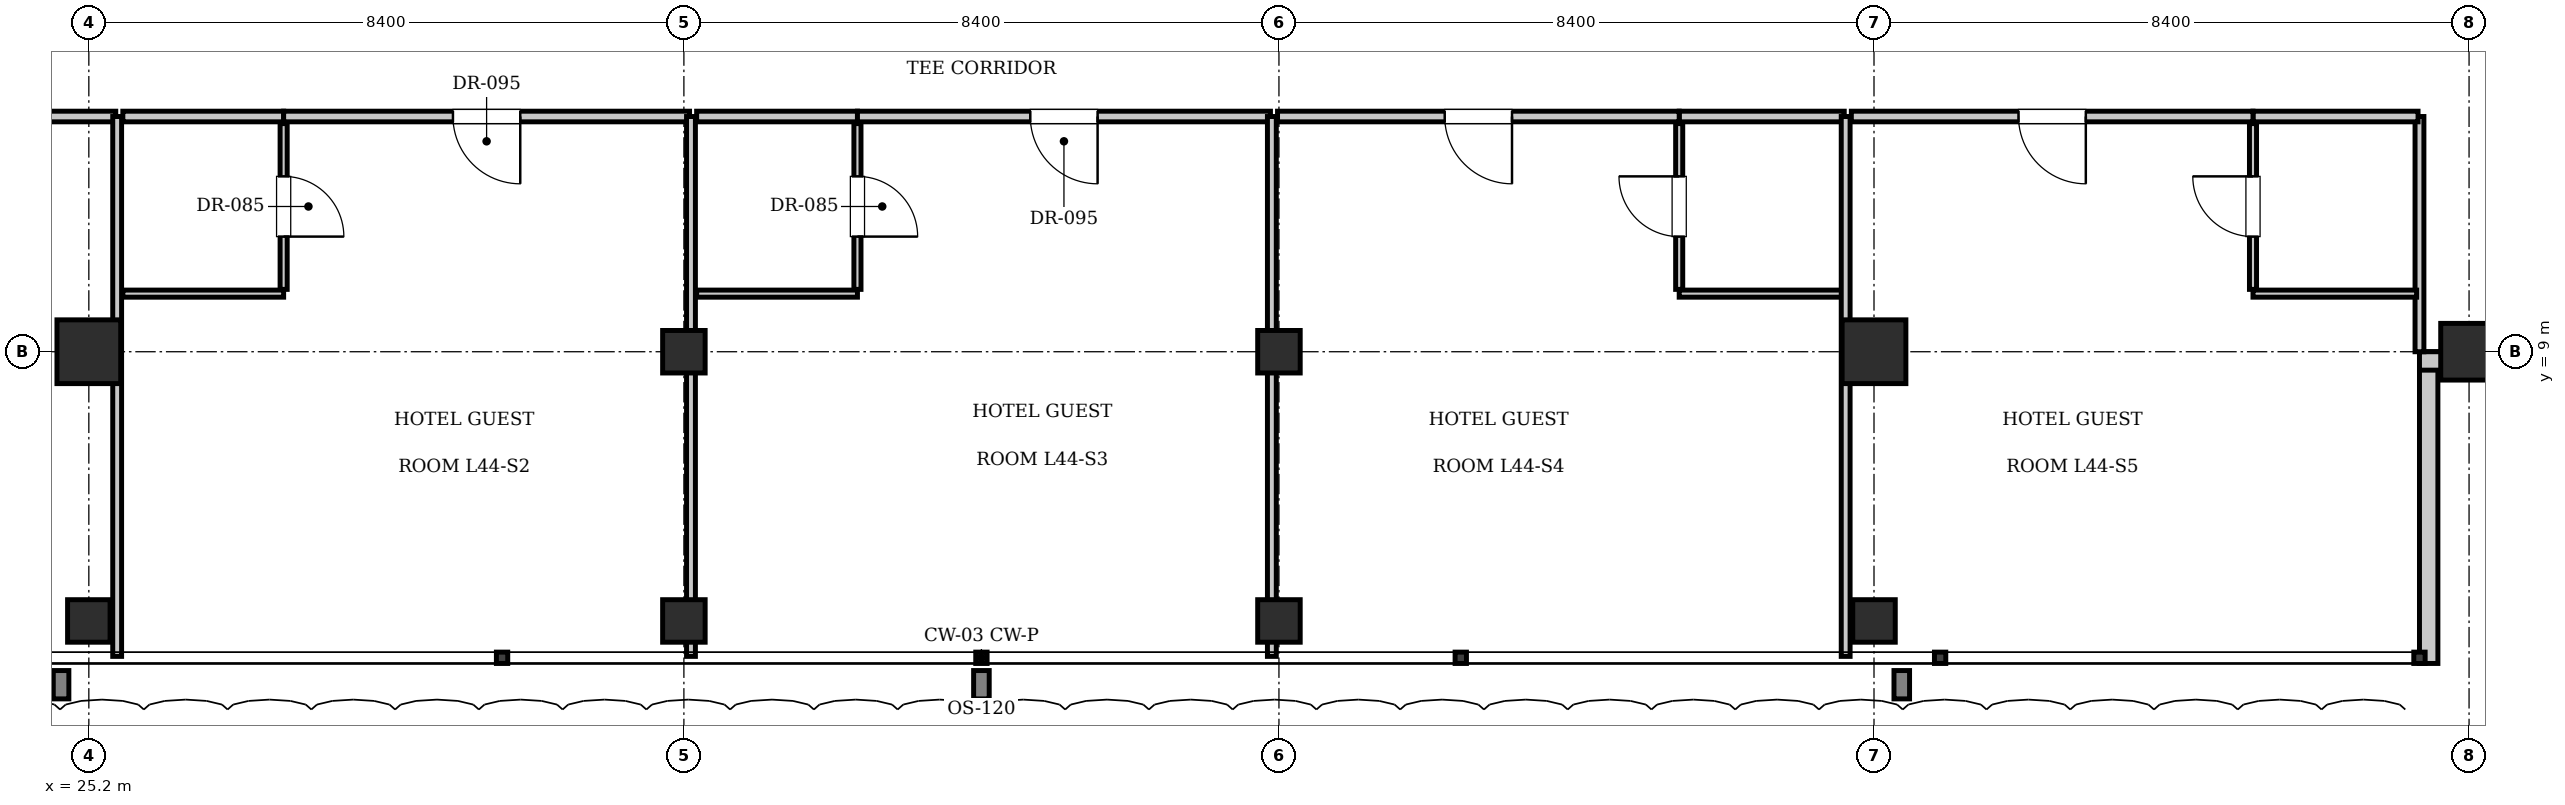
"""IFC4 building model, lengths in metres.
Left out: names, types, materials, properties, quantities, classifications, styles, units other than length and angle.
Written with IfcOpenShell. Run it as: python <this file> out.ifc"""

import sys

from ifc_helpers import new_model, si_unit, direction, frame, frame_2d, origin, origin_2d, place, context, subcontext, project, spatial, rectangle, i_section, extrude, element, fill, save


model = new_model("IFC4")
c1 = context("Model", 3, precision=1e-05, world=origin(), true_north=direction((0.0, 1.0)))
c2 = subcontext(c1, "Body", "Model", "MODEL_VIEW")
j1 = project(units=[si_unit("LENGTHUNIT", "METRE"), si_unit("PLANEANGLEUNIT", "RADIAN")], contexts=[c1])
p1 = place(None, origin())
s1 = spatial("IfcSite", under=j1, at=p1, CompositionType="ELEMENT")
p2 = place(p1, origin())
s2 = spatial("IfcBuilding", under=s1, at=p2, CompositionType="ELEMENT")
p3 = place(p2, frame((0.0, 0.0, 181.3)))
s3 = spatial("IfcBuildingStorey", under=s2, at=p3, CompositionType="ELEMENT", Elevation=181.3)
for number, where, z_axis, x_axis in (
    (1, (25.2, 9.0, 0.0), (0.0, 0.0, 1.0), (1.0, 0.0, 0.0)),
    (2, (50.4, 9.0, 0.0), (0.0, 0.0, 1.0), (1.0, 0.0, 0.0)),
):
    element("IfcColumn", number, at=place(p3, frame(where, z_axis=z_axis, x_axis=x_axis)), inside=s3, PredefinedType="COLUMN", context=c2, shape_type="SweptSolid", body=[
        extrude(rectangle(XDim=0.9, YDim=0.9, at=origin_2d()), origin(), (0.0, 0.0, 1.0), 3.85),
    ])
for number, where, z_axis, x_axis in (
    (3, (33.6, 9.0, 0.0), (0.0, 0.0, 1.0), (1.0, 0.0, 0.0)),
    (4, (42.0, 9.0, 0.0), (0.0, 0.0, 1.0), (1.0, 0.0, 0.0)),
):
    element("IfcColumn", number, at=place(p3, frame(where, z_axis=z_axis, x_axis=x_axis)), inside=s3, PredefinedType="COLUMN", context=c2, shape_type="SweptSolid", body=[
        extrude(i_section(OverallWidth=0.6, OverallDepth=0.6, WebThickness=0.025, FlangeThickness=0.038, at=origin_2d()), origin(), (0.0, 0.0, 1.0), 3.85),
    ])
p4 = place(p3, frame((58.8, 9.0, 0.0), z_axis=(0.0, 0.0, 1.0), x_axis=(1.0, 0.0, 0.0)))
e5 = element("IfcColumn", 5, at=p4, inside=s3, PredefinedType="COLUMN", context=c2, shape_type="SweptSolid", body=[
    extrude(rectangle(XDim=0.8, YDim=0.8, at=origin_2d()), origin(), (0.0, 0.0, 1.0), 3.85),
])
for number, where, z_axis, x_axis in (
    (6, (25.2, 5.2, 0.0), (0.0, 0.0, 1.0), (1.0, 0.0, 0.0)),
    (7, (33.6, 5.2, 0.0), (0.0, 0.0, 1.0), (1.0, 0.0, 0.0)),
    (8, (42.0, 5.2, 0.0), (0.0, 0.0, 1.0), (1.0, 0.0, 0.0)),
    (9, (50.4, 5.2, 0.0), (0.0, 0.0, 1.0), (1.0, 0.0, 0.0)),
):
    element("IfcColumn", number, at=place(p3, frame(where, z_axis=z_axis, x_axis=x_axis)), inside=s3, PredefinedType="COLUMN", context=c2, shape_type="SweptSolid", body=[
        extrude(i_section(OverallWidth=0.6, OverallDepth=0.6, WebThickness=0.025, FlangeThickness=0.038, at=origin_2d()), origin(), (0.0, 0.0, 1.0), 3.85),
    ])
p5 = place(p3, frame((58.23, 9.0, 0.0), z_axis=(0.0, 0.0, 1.0), x_axis=(0.0, -1.0, 0.0)))
e10 = element("IfcWall", 10, at=p5, inside=s3, PredefinedType="SOLIDWALL", context=c2, shape_type="SweptSolid", body=[
    extrude(rectangle(XDim=4.4, YDim=0.26, at=frame_2d((2.2, 0.0))), origin(), (0.0, 0.0, 1.0), 3.61),
])
p6 = place(p3, frame((62.5, 8.87, 0.0), z_axis=(0.0, 0.0, 1.0), x_axis=(-1.0, 0.0, 0.0)))
e11 = element("IfcWall", 11, at=p6, inside=s3, PredefinedType="SOLIDWALL", context=c2, shape_type="SweptSolid", body=[
    extrude(rectangle(XDim=4.4, YDim=0.26, at=frame_2d((2.2, 0.0))), origin(), (0.0, 0.0, 1.0), 3.007),
])
p7 = place(p3, frame((58.1, 9.0, 0.0), z_axis=(0.0, 0.0, 1.0), x_axis=(0.0, 1.0, 0.0)))
e12 = element("IfcWall", 12, at=p7, inside=s3, PredefinedType="PARTITIONING", context=c2, shape_type="SweptSolid", body=[
    extrude(rectangle(XDim=3.32, YDim=0.125, at=frame_2d((1.66, 0.0))), origin(), (0.0, 0.0, 1.0), 3.61),
])
p8 = place(p3, frame((19.85, 12.32, 0.0), z_axis=(0.0, 0.0, 1.0), x_axis=(1.0, 0.0, 0.0)))
e13 = element("IfcWall", 13, at=p8, inside=s3, PredefinedType="PARTITIONING", context=c2, shape_type="SweptSolid", body=[
    extrude(rectangle(XDim=5.73, YDim=0.15, at=frame_2d((2.865, 0.0))), origin(), (0.0, 0.0, 1.0), 3.61),
])
p9 = place(p8, frame((2.39, 0.0, 0.0)))
e14 = element("IfcOpeningElement", 14, at=p9, cuts=e13, PredefinedType="OPENING", context=c2, shape_type="SweptSolid", body=[
    extrude(rectangle(XDim=0.95, YDim=2.15, at=frame_2d((0.475, 1.075))), frame((0.0, 0.085, 0.0), z_axis=(0.0, -1.0, 0.0), x_axis=(1.0, 0.0, 0.0)), (0.0, 0.0, 1.0), 0.17),
])
p10 = place(p3, frame((25.6, 4.7, 0.0), z_axis=(0.0, 0.0, 1.0), x_axis=(0.0, 1.0, 0.0)))
e15 = element("IfcWall", 15, at=p10, inside=s3, PredefinedType="PARTITIONING", context=c2, shape_type="SweptSolid", body=[
    extrude(rectangle(XDim=7.62, YDim=0.125, at=frame_2d((3.81, 0.0))), origin(), (0.0, 0.0, 1.0), 3.61),
])
p11 = place(p3, frame((25.68, 12.32, 0.0), z_axis=(0.0, 0.0, 1.0), x_axis=(1.0, 0.0, 0.0)))
e16 = element("IfcWall", 16, at=p11, inside=s3, PredefinedType="PARTITIONING", context=c2, shape_type="SweptSolid", body=[
    extrude(rectangle(XDim=2.27, YDim=0.15, at=frame_2d((1.135, 0.0))), origin(), (0.0, 0.0, 1.0), 3.61),
])
p12 = place(p3, frame((25.68, 9.82, 0.0), z_axis=(0.0, 0.0, 1.0), x_axis=(1.0, 0.0, 0.0)))
e17 = element("IfcWall", 17, at=p12, inside=s3, PredefinedType="PARTITIONING", context=c2, shape_type="SweptSolid", body=[
    extrude(rectangle(XDim=2.27, YDim=0.1, at=frame_2d((1.135, 0.0))), origin(), (0.0, 0.0, 1.0), 3.61),
])
p13 = place(p3, frame((27.95, 9.88, 0.0), z_axis=(0.0, 0.0, 1.0), x_axis=(0.0, 1.0, 0.0)))
e18 = element("IfcWall", 18, at=p13, inside=s3, PredefinedType="PARTITIONING", context=c2, shape_type="SweptSolid", body=[
    extrude(rectangle(XDim=2.34, YDim=0.1, at=frame_2d((1.17, 0.0))), origin(), (0.0, 0.0, 1.0), 3.61),
])
p14 = place(p13, frame((0.745, 0.0, 0.0)))
e19 = element("IfcOpeningElement", 19, at=p14, cuts=e18, PredefinedType="OPENING", context=c2, shape_type="SweptSolid", body=[
    extrude(rectangle(XDim=0.85, YDim=2.1, at=frame_2d((0.425, 1.05))), frame((0.0, 0.06, 0.0), z_axis=(0.0, -1.0, 0.0), x_axis=(1.0, 0.0, 0.0)), (0.0, 0.0, 1.0), 0.12),
])
p15 = place(p3, frame((27.95, 12.32, 0.0), z_axis=(0.0, 0.0, 1.0), x_axis=(1.0, 0.0, 0.0)))
e20 = element("IfcWall", 20, at=p15, inside=s3, PredefinedType="PARTITIONING", context=c2, shape_type="SweptSolid", body=[
    extrude(rectangle(XDim=5.73, YDim=0.15, at=frame_2d((2.865, 0.0))), origin(), (0.0, 0.0, 1.0), 3.61),
])
p16 = place(p15, frame((2.39, 0.0, 0.0)))
e21 = element("IfcOpeningElement", 21, at=p16, cuts=e20, PredefinedType="OPENING", context=c2, shape_type="SweptSolid", body=[
    extrude(rectangle(XDim=0.95, YDim=2.15, at=frame_2d((0.475, 1.075))), frame((0.0, 0.085, 0.0), z_axis=(0.0, -1.0, 0.0), x_axis=(1.0, 0.0, 0.0)), (0.0, 0.0, 1.0), 0.17),
])
p17 = place(p3, frame((33.7, 4.7, 0.0), z_axis=(0.0, 0.0, 1.0), x_axis=(0.0, 1.0, 0.0)))
e22 = element("IfcWall", 22, at=p17, inside=s3, PredefinedType="PARTITIONING", context=c2, shape_type="SweptSolid", body=[
    extrude(rectangle(XDim=7.62, YDim=0.125, at=frame_2d((3.81, 0.0))), origin(), (0.0, 0.0, 1.0), 3.007),
])
p18 = place(p3, frame((33.78, 12.32, 0.0), z_axis=(0.0, 0.0, 1.0), x_axis=(1.0, 0.0, 0.0)))
e23 = element("IfcWall", 23, at=p18, inside=s3, PredefinedType="PARTITIONING", context=c2, shape_type="SweptSolid", body=[
    extrude(rectangle(XDim=2.27, YDim=0.15, at=frame_2d((1.135, 0.0))), origin(), (0.0, 0.0, 1.0), 3.61),
])
p19 = place(p3, frame((33.78, 9.82, 0.0), z_axis=(0.0, 0.0, 1.0), x_axis=(1.0, 0.0, 0.0)))
e24 = element("IfcWall", 24, at=p19, inside=s3, PredefinedType="PARTITIONING", context=c2, shape_type="SweptSolid", body=[
    extrude(rectangle(XDim=2.27, YDim=0.1, at=frame_2d((1.135, 0.0))), origin(), (0.0, 0.0, 1.0), 3.61),
])
p20 = place(p3, frame((36.05, 9.88, 0.0), z_axis=(0.0, 0.0, 1.0), x_axis=(0.0, 1.0, 0.0)))
e25 = element("IfcWall", 25, at=p20, inside=s3, PredefinedType="PARTITIONING", context=c2, shape_type="SweptSolid", body=[
    extrude(rectangle(XDim=2.34, YDim=0.1, at=frame_2d((1.17, 0.0))), origin(), (0.0, 0.0, 1.0), 3.61),
])
p21 = place(p20, frame((0.745, 0.0, 0.0)))
e26 = element("IfcOpeningElement", 26, at=p21, cuts=e25, PredefinedType="OPENING", context=c2, shape_type="SweptSolid", body=[
    extrude(rectangle(XDim=0.85, YDim=2.1, at=frame_2d((0.425, 1.05))), frame((0.0, 0.06, 0.0), z_axis=(0.0, -1.0, 0.0), x_axis=(1.0, 0.0, 0.0)), (0.0, 0.0, 1.0), 0.12),
])
p22 = place(p3, frame((36.05, 12.32, 0.0), z_axis=(0.0, 0.0, 1.0), x_axis=(1.0, 0.0, 0.0)))
e27 = element("IfcWall", 27, at=p22, inside=s3, PredefinedType="PARTITIONING", context=c2, shape_type="SweptSolid", body=[
    extrude(rectangle(XDim=5.83, YDim=0.15, at=frame_2d((2.915, 0.0))), origin(), (0.0, 0.0, 1.0), 3.61),
])
p23 = place(p22, frame((2.44, 0.0, 0.0)))
e28 = element("IfcOpeningElement", 28, at=p23, cuts=e27, PredefinedType="OPENING", context=c2, shape_type="SweptSolid", body=[
    extrude(rectangle(XDim=0.95, YDim=2.15, at=frame_2d((0.475, 1.075))), frame((0.0, 0.085, 0.0), z_axis=(0.0, -1.0, 0.0), x_axis=(1.0, 0.0, 0.0)), (0.0, 0.0, 1.0), 0.17),
])
p24 = place(p3, frame((41.9, 4.7, 0.0), z_axis=(0.0, 0.0, 1.0), x_axis=(0.0, 1.0, 0.0)))
e29 = element("IfcWall", 29, at=p24, inside=s3, PredefinedType="PARTITIONING", context=c2, shape_type="SweptSolid", body=[
    extrude(rectangle(XDim=7.62, YDim=0.125, at=frame_2d((3.81, 0.0))), origin(), (0.0, 0.0, 1.0), 3.007),
])
p25 = place(p3, frame((47.65, 12.32, 0.0), z_axis=(0.0, 0.0, 1.0), x_axis=(1.0, 0.0, 0.0)))
e30 = element("IfcWall", 30, at=p25, inside=s3, PredefinedType="PARTITIONING", context=c2, shape_type="SweptSolid", body=[
    extrude(rectangle(XDim=2.33, YDim=0.15, at=frame_2d((1.165, 0.0))), origin(), (0.0, 0.0, 1.0), 3.61),
])
p26 = place(p3, frame((47.65, 9.82, 0.0), z_axis=(0.0, 0.0, 1.0), x_axis=(1.0, 0.0, 0.0)))
e31 = element("IfcWall", 31, at=p26, inside=s3, PredefinedType="PARTITIONING", context=c2, shape_type="SweptSolid", body=[
    extrude(rectangle(XDim=2.31, YDim=0.1, at=frame_2d((1.155, 0.0))), origin(), (0.0, 0.0, 1.0), 3.61),
])
p27 = place(p3, frame((47.65, 9.88, 0.0), z_axis=(0.0, 0.0, 1.0), x_axis=(0.0, 1.0, 0.0)))
e32 = element("IfcWall", 32, at=p27, inside=s3, PredefinedType="PARTITIONING", context=c2, shape_type="SweptSolid", body=[
    extrude(rectangle(XDim=2.34, YDim=0.1, at=frame_2d((1.17, 0.0))), origin(), (0.0, 0.0, 1.0), 3.61),
])
p28 = place(p27, frame((0.745, 0.0, 0.0)))
e33 = element("IfcOpeningElement", 33, at=p28, cuts=e32, PredefinedType="OPENING", context=c2, shape_type="SweptSolid", body=[
    extrude(rectangle(XDim=0.85, YDim=2.1, at=frame_2d((0.425, 1.05))), frame((0.0, 0.06, 0.0), z_axis=(0.0, -1.0, 0.0), x_axis=(1.0, 0.0, 0.0)), (0.0, 0.0, 1.0), 0.12),
])
p29 = place(p3, frame((41.98, 12.32, 0.0), z_axis=(0.0, 0.0, 1.0), x_axis=(1.0, 0.0, 0.0)))
e34 = element("IfcWall", 34, at=p29, inside=s3, PredefinedType="PARTITIONING", context=c2, shape_type="SweptSolid", body=[
    extrude(rectangle(XDim=5.67, YDim=0.15, at=frame_2d((2.835, 0.0))), origin(), (0.0, 0.0, 1.0), 3.61),
])
p30 = place(p29, frame((2.36, 0.0, 0.0)))
e35 = element("IfcOpeningElement", 35, at=p30, cuts=e34, PredefinedType="OPENING", context=c2, shape_type="SweptSolid", body=[
    extrude(rectangle(XDim=0.95, YDim=2.15, at=frame_2d((0.475, 1.075))), frame((0.0, 0.085, 0.0), z_axis=(0.0, -1.0, 0.0), x_axis=(1.0, 0.0, 0.0)), (0.0, 0.0, 1.0), 0.17),
])
p31 = place(p3, frame((50.0, 4.7, 0.0), z_axis=(0.0, 0.0, 1.0), x_axis=(0.0, 1.0, 0.0)))
e36 = element("IfcWall", 36, at=p31, inside=s3, PredefinedType="PARTITIONING", context=c2, shape_type="SweptSolid", body=[
    extrude(rectangle(XDim=7.62, YDim=0.125, at=frame_2d((3.81, 0.0))), origin(), (0.0, 0.0, 1.0), 3.61),
])
p32 = place(p3, frame((55.75, 12.32, 0.0), z_axis=(0.0, 0.0, 1.0), x_axis=(1.0, 0.0, 0.0)))
e37 = element("IfcWall", 37, at=p32, inside=s3, PredefinedType="PARTITIONING", context=c2, shape_type="SweptSolid", body=[
    extrude(rectangle(XDim=2.33, YDim=0.15, at=frame_2d((1.165, 0.0))), origin(), (0.0, 0.0, 1.0), 3.61),
])
p33 = place(p3, frame((55.75, 9.82, 0.0), z_axis=(0.0, 0.0, 1.0), x_axis=(1.0, 0.0, 0.0)))
e38 = element("IfcWall", 38, at=p33, inside=s3, PredefinedType="PARTITIONING", context=c2, shape_type="SweptSolid", body=[
    extrude(rectangle(XDim=2.31, YDim=0.1, at=frame_2d((1.155, 0.0))), origin(), (0.0, 0.0, 1.0), 3.61),
])
p34 = place(p3, frame((55.75, 9.88, 0.0), z_axis=(0.0, 0.0, 1.0), x_axis=(0.0, 1.0, 0.0)))
e39 = element("IfcWall", 39, at=p34, inside=s3, PredefinedType="PARTITIONING", context=c2, shape_type="SweptSolid", body=[
    extrude(rectangle(XDim=2.34, YDim=0.1, at=frame_2d((1.17, 0.0))), origin(), (0.0, 0.0, 1.0), 3.61),
])
p35 = place(p34, frame((0.745, 0.0, 0.0)))
e40 = element("IfcOpeningElement", 40, at=p35, cuts=e39, PredefinedType="OPENING", context=c2, shape_type="SweptSolid", body=[
    extrude(rectangle(XDim=0.85, YDim=2.1, at=frame_2d((0.425, 1.05))), frame((0.0, 0.06, 0.0), z_axis=(0.0, -1.0, 0.0), x_axis=(1.0, 0.0, 0.0)), (0.0, 0.0, 1.0), 0.12),
])
p36 = place(p3, frame((50.08, 12.32, 0.0), z_axis=(0.0, 0.0, 1.0), x_axis=(1.0, 0.0, 0.0)))
e41 = element("IfcWall", 41, at=p36, inside=s3, PredefinedType="PARTITIONING", context=c2, shape_type="SweptSolid", body=[
    extrude(rectangle(XDim=5.67, YDim=0.15, at=frame_2d((2.835, 0.0))), origin(), (0.0, 0.0, 1.0), 3.61),
])
p37 = place(p36, frame((2.36, 0.0, 0.0)))
e42 = element("IfcOpeningElement", 42, at=p37, cuts=e41, PredefinedType="OPENING", context=c2, shape_type="SweptSolid", body=[
    extrude(rectangle(XDim=0.95, YDim=2.15, at=frame_2d((0.475, 1.075))), frame((0.0, 0.085, 0.0), z_axis=(0.0, -1.0, 0.0), x_axis=(1.0, 0.0, 0.0)), (0.0, 0.0, 1.0), 0.17),
])
p38 = place(p14, frame((0.85, 0.0, 0.0), z_axis=(0.0, 0.0, 1.0), x_axis=(-1.0, 0.0, 0.0)))
e43 = element("IfcDoor", 43, at=p38, inside=s3, OperationType="SINGLE_SWING_RIGHT", PredefinedType="DOOR", context=c2, shape_type="SweptSolid", body=[
    extrude(rectangle(XDim=0.85, YDim=2.1, at=frame_2d((0.425, 1.05))), frame((0.0, 0.025, 0.0), z_axis=(0.0, -1.0, 0.0), x_axis=(1.0, 0.0, 0.0)), (0.0, 0.0, 1.0), 0.05),
])
fill(e19, e43)
p39 = place(p16, frame((0.95, 0.0, 0.0), z_axis=(0.0, 0.0, 1.0), x_axis=(-1.0, 0.0, 0.0)))
e44 = element("IfcDoor", 44, at=p39, inside=s3, OperationType="SINGLE_SWING_LEFT", PredefinedType="DOOR", context=c2, shape_type="SweptSolid", body=[
    extrude(rectangle(XDim=0.95, YDim=2.15, at=frame_2d((0.475, 1.075))), frame((0.0, 0.025, 0.0), z_axis=(0.0, -1.0, 0.0), x_axis=(1.0, 0.0, 0.0)), (0.0, 0.0, 1.0), 0.05),
])
fill(e21, e44)
p40 = place(p21, frame((0.85, 0.0, 0.0), z_axis=(0.0, 0.0, 1.0), x_axis=(-1.0, 0.0, 0.0)))
e45 = element("IfcDoor", 45, at=p40, inside=s3, OperationType="SINGLE_SWING_RIGHT", PredefinedType="DOOR", context=c2, shape_type="SweptSolid", body=[
    extrude(rectangle(XDim=0.85, YDim=2.1, at=frame_2d((0.425, 1.05))), frame((0.0, 0.025, 0.0), z_axis=(0.0, -1.0, 0.0), x_axis=(1.0, 0.0, 0.0)), (0.0, 0.0, 1.0), 0.05),
])
fill(e26, e45)
p41 = place(p23, frame((0.95, 0.0, 0.0), z_axis=(0.0, 0.0, 1.0), x_axis=(-1.0, 0.0, 0.0)))
e46 = element("IfcDoor", 46, at=p41, inside=s3, OperationType="SINGLE_SWING_LEFT", PredefinedType="DOOR", context=c2, shape_type="SweptSolid", body=[
    extrude(rectangle(XDim=0.95, YDim=2.15, at=frame_2d((0.475, 1.075))), frame((0.0, 0.025, 0.0), z_axis=(0.0, -1.0, 0.0), x_axis=(1.0, 0.0, 0.0)), (0.0, 0.0, 1.0), 0.05),
])
fill(e28, e46)
p42 = place(p28, origin())
e47 = element("IfcDoor", 47, at=p42, inside=s3, OperationType="SINGLE_SWING_RIGHT", PredefinedType="DOOR", context=c2, shape_type="SweptSolid", body=[
    extrude(rectangle(XDim=0.85, YDim=2.1, at=frame_2d((0.425, 1.05))), frame((0.0, 0.025, 0.0), z_axis=(0.0, -1.0, 0.0), x_axis=(1.0, 0.0, 0.0)), (0.0, 0.0, 1.0), 0.05),
])
fill(e33, e47)
p43 = place(p30, frame((0.95, 0.0, 0.0), z_axis=(0.0, 0.0, 1.0), x_axis=(-1.0, 0.0, 0.0)))
e48 = element("IfcDoor", 48, at=p43, inside=s3, OperationType="SINGLE_SWING_LEFT", PredefinedType="DOOR", context=c2, shape_type="SweptSolid", body=[
    extrude(rectangle(XDim=0.95, YDim=2.15, at=frame_2d((0.475, 1.075))), frame((0.0, 0.025, 0.0), z_axis=(0.0, -1.0, 0.0), x_axis=(1.0, 0.0, 0.0)), (0.0, 0.0, 1.0), 0.05),
])
fill(e35, e48)
p44 = place(p35, origin())
e49 = element("IfcDoor", 49, at=p44, inside=s3, OperationType="SINGLE_SWING_RIGHT", PredefinedType="DOOR", context=c2, shape_type="SweptSolid", body=[
    extrude(rectangle(XDim=0.85, YDim=2.1, at=frame_2d((0.425, 1.05))), frame((0.0, 0.025, 0.0), z_axis=(0.0, -1.0, 0.0), x_axis=(1.0, 0.0, 0.0)), (0.0, 0.0, 1.0), 0.05),
])
fill(e40, e49)
p45 = place(p37, frame((0.95, 0.0, 0.0), z_axis=(0.0, 0.0, 1.0), x_axis=(-1.0, 0.0, 0.0)))
e50 = element("IfcDoor", 50, at=p45, inside=s3, OperationType="SINGLE_SWING_LEFT", PredefinedType="DOOR", context=c2, shape_type="SweptSolid", body=[
    extrude(rectangle(XDim=0.95, YDim=2.15, at=frame_2d((0.475, 1.075))), frame((0.0, 0.025, 0.0), z_axis=(0.0, -1.0, 0.0), x_axis=(1.0, 0.0, 0.0)), (0.0, 0.0, 1.0), 0.05),
])
fill(e42, e50)
save(model, sys.argv[1])
